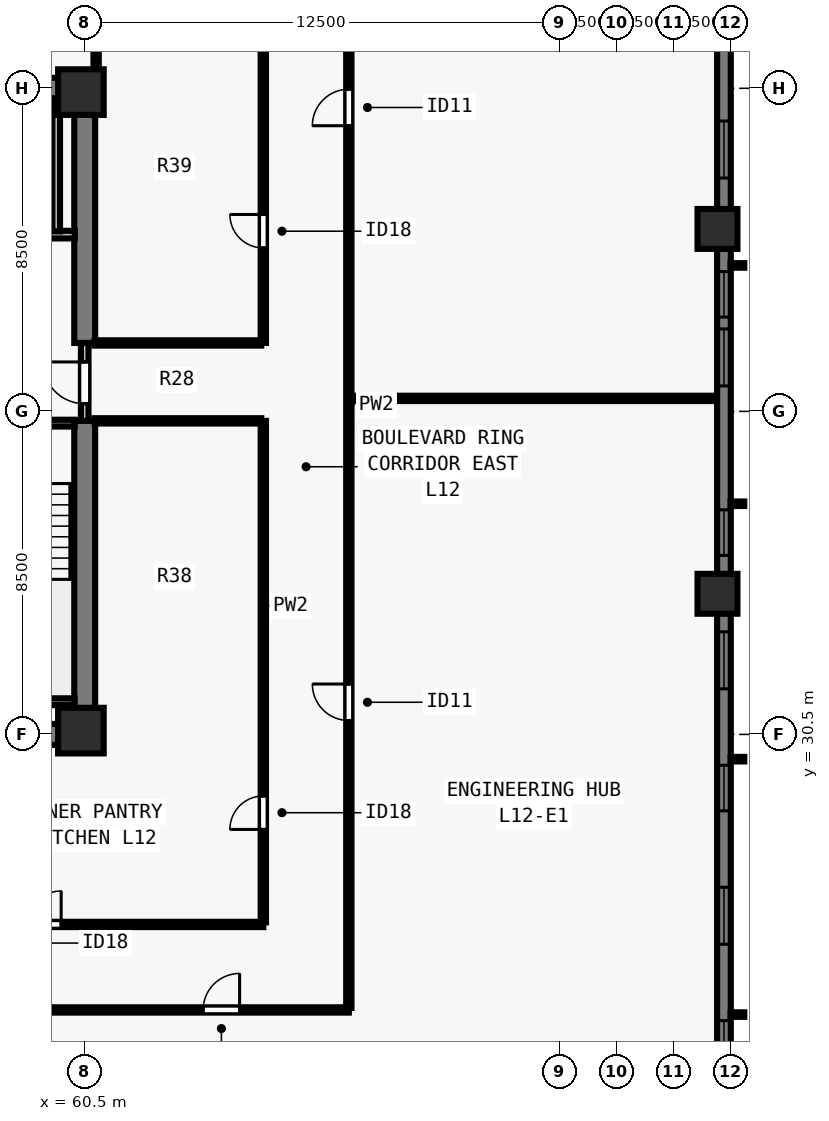
"""IFC4 building model, lengths in metres.
Left out: names, types, materials, properties, quantities, classifications, styles, units other than length and angle.
Written with IfcOpenShell. Run it as: python <this file> out.ifc"""

import sys

from ifc_helpers import new_model, si_unit, direction, frame, frame_2d, origin, origin_2d, place, context, subcontext, project, spatial, rectangle, extrude, element, fill, save


model = new_model("IFC4")
c1 = context("Model", 3, precision=1e-05, world=origin(), true_north=direction((0.0, 1.0)))
c2 = subcontext(c1, "Body", "Model", "MODEL_VIEW")
j1 = project(units=[si_unit("LENGTHUNIT", "METRE"), si_unit("PLANEANGLEUNIT", "RADIAN")], contexts=[c1])
p1 = place(None, origin())
s1 = spatial("IfcSite", under=j1, at=p1, CompositionType="ELEMENT")
p2 = place(p1, origin())
s2 = spatial("IfcBuilding", under=s1, at=p2, CompositionType="ELEMENT")
p3 = place(p2, frame((0.0, 0.0, 48.0)))
s3 = spatial("IfcBuildingStorey", under=s2, at=p3, CompositionType="ELEMENT", Elevation=48.0)
for number, where, z_axis, x_axis in (
    (1, (60.4, 30.6, 0.0), (0.0, 0.0, 1.0), (1.0, 0.0, 0.0)),
    (2, (60.4, 47.4, 0.0), (0.0, 0.0, 1.0), (1.0, 0.0, 0.0)),
):
    element("IfcColumn", number, at=place(p3, frame(where, z_axis=z_axis, x_axis=x_axis)), inside=s3, PredefinedType="COLUMN", context=c2, shape_type="SweptSolid", body=[
        extrude(rectangle(XDim=1.2, YDim=1.2, at=origin_2d()), origin(), (0.0, 0.0, 1.0), 3.5),
    ])
for number, where, z_axis, x_axis in (
    (3, (77.15, 34.2, 0.0), (0.0, 0.0, 1.0), (0.0, 1.0, 0.0)),
    (4, (77.15, 43.8, 0.0), (0.0, 0.0, 1.0), (0.0, 1.0, 0.0)),
):
    element("IfcColumn", number, at=place(p3, frame(where, z_axis=z_axis, x_axis=x_axis)), inside=s3, PredefinedType="COLUMN", context=c2, shape_type="SweptSolid", body=[
        extrude(rectangle(XDim=1.05, YDim=1.05, at=origin_2d()), origin(), (0.0, 0.0, 1.0), 3.5),
    ])
p4 = place(p3, frame((77.32, 61.5, 0.0), z_axis=(0.0, 0.0, 1.0), x_axis=(0.0, -1.0, 0.0)))
e5 = element("IfcWall", 5, at=p4, inside=s3, PredefinedType="SOLIDWALL", context=c2, shape_type="SweptSolid", body=[
    extrude(rectangle(XDim=44.662, YDim=0.36, at=frame_2d((22.331, 0.0))), origin(), (0.0, 0.0, 1.0), 3.28),
])
p5 = place(p4, frame((4.93, 0.0, 0.8)))
e6 = element("IfcOpeningElement", 6, at=p5, cuts=e5, PredefinedType="OPENING", context=c2, shape_type="SweptSolid", body=[
    extrude(rectangle(XDim=1.2, YDim=1.544, at=frame_2d((0.6, 0.772))), frame((0.0, 0.19, 0.0), z_axis=(0.0, -1.0, 0.0), x_axis=(1.0, 0.0, 0.0)), (0.0, 0.0, 1.0), 0.38),
])
p6 = place(p4, frame((8.14, 0.0, 0.8)))
e7 = element("IfcOpeningElement", 7, at=p6, cuts=e5, PredefinedType="OPENING", context=c2, shape_type="SweptSolid", body=[
    extrude(rectangle(XDim=1.5, YDim=1.544, at=frame_2d((0.75, 0.772))), frame((0.0, 0.19, 0.0), z_axis=(0.0, -1.0, 0.0), x_axis=(1.0, 0.0, 0.0)), (0.0, 0.0, 1.0), 0.38),
])
p7 = place(p4, frame((11.65, 0.0, 0.8)))
e8 = element("IfcOpeningElement", 8, at=p7, cuts=e5, PredefinedType="OPENING", context=c2, shape_type="SweptSolid", body=[
    extrude(rectangle(XDim=1.2, YDim=1.544, at=frame_2d((0.6, 0.772))), frame((0.0, 0.19, 0.0), z_axis=(0.0, -1.0, 0.0), x_axis=(1.0, 0.0, 0.0)), (0.0, 0.0, 1.0), 0.38),
])
p8 = place(p4, frame((14.861, 0.0, 0.8)))
e9 = element("IfcOpeningElement", 9, at=p8, cuts=e5, PredefinedType="OPENING", context=c2, shape_type="SweptSolid", body=[
    extrude(rectangle(XDim=1.5, YDim=1.544, at=frame_2d((0.75, 0.772))), frame((0.0, 0.19, 0.0), z_axis=(0.0, -1.0, 0.0), x_axis=(1.0, 0.0, 0.0)), (0.0, 0.0, 1.0), 0.38),
])
p9 = place(p4, frame((18.821, 0.0, 0.8)))
e10 = element("IfcOpeningElement", 10, at=p9, cuts=e5, PredefinedType="OPENING", context=c2, shape_type="SweptSolid", body=[
    extrude(rectangle(XDim=1.2, YDim=1.544, at=frame_2d((0.6, 0.772))), frame((0.0, 0.19, 0.0), z_axis=(0.0, -1.0, 0.0), x_axis=(1.0, 0.0, 0.0)), (0.0, 0.0, 1.0), 0.38),
])
p10 = place(p4, frame((20.331, 0.0, 0.8)))
e11 = element("IfcOpeningElement", 11, at=p10, cuts=e5, PredefinedType="OPENING", context=c2, shape_type="SweptSolid", body=[
    extrude(rectangle(XDim=1.5, YDim=1.544, at=frame_2d((0.75, 0.772))), frame((0.0, 0.19, 0.0), z_axis=(0.0, -1.0, 0.0), x_axis=(1.0, 0.0, 0.0)), (0.0, 0.0, 1.0), 0.38),
])
p11 = place(p4, frame((25.091, 0.0, 0.8)))
e12 = element("IfcOpeningElement", 12, at=p11, cuts=e5, PredefinedType="OPENING", context=c2, shape_type="SweptSolid", body=[
    extrude(rectangle(XDim=1.2, YDim=1.544, at=frame_2d((0.6, 0.772))), frame((0.0, 0.19, 0.0), z_axis=(0.0, -1.0, 0.0), x_axis=(1.0, 0.0, 0.0)), (0.0, 0.0, 1.0), 0.38),
])
p12 = place(p4, frame((28.302, 0.0, 0.8)))
e13 = element("IfcOpeningElement", 13, at=p12, cuts=e5, PredefinedType="OPENING", context=c2, shape_type="SweptSolid", body=[
    extrude(rectangle(XDim=1.5, YDim=1.544, at=frame_2d((0.75, 0.772))), frame((0.0, 0.19, 0.0), z_axis=(0.0, -1.0, 0.0), x_axis=(1.0, 0.0, 0.0)), (0.0, 0.0, 1.0), 0.38),
])
p13 = place(p4, frame((31.812, 0.0, 0.8)))
e14 = element("IfcOpeningElement", 14, at=p13, cuts=e5, PredefinedType="OPENING", context=c2, shape_type="SweptSolid", body=[
    extrude(rectangle(XDim=1.2, YDim=1.544, at=frame_2d((0.6, 0.772))), frame((0.0, 0.19, 0.0), z_axis=(0.0, -1.0, 0.0), x_axis=(1.0, 0.0, 0.0)), (0.0, 0.0, 1.0), 0.38),
])
p14 = place(p4, frame((35.022, 0.0, 0.8)))
e15 = element("IfcOpeningElement", 15, at=p14, cuts=e5, PredefinedType="OPENING", context=c2, shape_type="SweptSolid", body=[
    extrude(rectangle(XDim=1.5, YDim=1.544, at=frame_2d((0.75, 0.772))), frame((0.0, 0.19, 0.0), z_axis=(0.0, -1.0, 0.0), x_axis=(1.0, 0.0, 0.0)), (0.0, 0.0, 1.0), 0.38),
])
p15 = place(p4, frame((38.532, 0.0, 0.8)))
e16 = element("IfcOpeningElement", 16, at=p15, cuts=e5, PredefinedType="OPENING", context=c2, shape_type="SweptSolid", body=[
    extrude(rectangle(XDim=1.2, YDim=1.544, at=frame_2d((0.6, 0.772))), frame((0.0, 0.19, 0.0), z_axis=(0.0, -1.0, 0.0), x_axis=(1.0, 0.0, 0.0)), (0.0, 0.0, 1.0), 0.38),
])
for number, where, z_axis, x_axis in (
    (17, (43.225, 30.5, 0.0), (0.0, 0.0, 1.0), (1.0, 0.0, 0.0)),
    (18, (43.225, 47.5, 0.0), (0.0, 0.0, 1.0), (1.0, 0.0, 0.0)),
):
    element("IfcWall", number, at=place(p3, frame(where, z_axis=z_axis, x_axis=x_axis)), inside=s3, PredefinedType="SHEAR", context=c2, shape_type="SweptSolid", body=[
        extrude(rectangle(XDim=17.55, YDim=0.55, at=frame_2d((8.775, 0.0))), origin(), (0.0, 0.0, 1.0), 3.28),
    ])
p16 = place(p3, frame((60.5, 30.765, 0.0), z_axis=(0.0, 0.0, 1.0), x_axis=(0.0, 1.0, 0.0)))
e19 = element("IfcWall", 19, at=p16, inside=s3, PredefinedType="SHEAR", context=c2, shape_type="SweptSolid", body=[
    extrude(rectangle(XDim=7.985, YDim=0.55, at=frame_2d((3.993, 0.0))), origin(), (0.0, 0.0, 1.0), 3.28),
])
p17 = place(p3, frame((60.5, 40.8, 0.0), z_axis=(0.0, 0.0, 1.0), x_axis=(0.0, 1.0, 0.0)))
e20 = element("IfcWall", 20, at=p17, inside=s3, PredefinedType="SHEAR", context=c2, shape_type="SweptSolid", body=[
    extrude(rectangle(XDim=6.435, YDim=0.55, at=frame_2d((3.218, 0.0))), origin(), (0.0, 0.0, 1.0), 3.28),
])
p18 = place(p3, frame((60.5, 38.75, 0.0), z_axis=(0.0, 0.0, 1.0), x_axis=(0.0, 1.0, 0.0)))
e21 = element("IfcWall", 21, at=p18, inside=s3, PredefinedType="SOLIDWALL", context=c2, shape_type="SweptSolid", body=[
    extrude(rectangle(XDim=2.05, YDim=0.2, at=frame_2d((1.025, 0.0))), origin(), (0.0, 0.0, 1.0), 3.28),
])
p19 = place(p18, frame((0.45, 0.0, 0.0)))
e22 = element("IfcOpeningElement", 22, at=p19, cuts=e21, PredefinedType="OPENING", context=c2, shape_type="SweptSolid", body=[
    extrude(rectangle(XDim=1.1, YDim=2.15, at=frame_2d((0.55, 1.075))), frame((0.0, 0.11, 0.0), z_axis=(0.0, -1.0, 0.0), x_axis=(1.0, 0.0, 0.0)), (0.0, 0.0, 1.0), 0.22),
])
p20 = place(p3, frame((56.735, 43.65, 0.0), z_axis=(0.0, 0.0, 1.0), x_axis=(1.0, 0.0, 0.0)))
e23 = element("IfcWall", 23, at=p20, inside=s3, PredefinedType="SOLIDWALL", context=c2, shape_type="SweptSolid", body=[
    extrude(rectangle(XDim=3.505, YDim=0.2, at=frame_2d((1.752, 0.0))), origin(), (0.0, 0.0, 1.0), 3.28),
])
p21 = place(p20, frame((1.295, 0.0, 0.0)))
e24 = element("IfcOpeningElement", 24, at=p21, cuts=e23, PredefinedType="OPENING", context=c2, shape_type="SweptSolid", body=[
    extrude(rectangle(XDim=1.1, YDim=2.2, at=frame_2d((0.55, 1.1))), frame((0.0, 0.11, 0.0), z_axis=(0.0, -1.0, 0.0), x_axis=(1.0, 0.0, 0.0)), (0.0, 0.0, 1.0), 0.22),
])
p22 = place(p3, frame((59.75, 43.735, 0.0), z_axis=(0.0, 0.0, 1.0), x_axis=(0.0, 1.0, 0.0)))
e25 = element("IfcWall", 25, at=p22, inside=s3, PredefinedType="SOLIDWALL", context=c2, shape_type="SweptSolid", body=[
    extrude(rectangle(XDim=3.505, YDim=0.2, at=frame_2d((1.752, 0.0))), origin(), (0.0, 0.0, 1.0), 3.28),
])
p23 = place(p3, frame((36.55, 23.25, 0.0), z_axis=(0.0, 0.0, 1.0), x_axis=(1.0, 0.0, 0.0)))
e26 = element("IfcWall", 26, at=p23, inside=s3, PredefinedType="PARTITIONING", context=c2, shape_type="SweptSolid", body=[
    extrude(rectangle(XDim=30.9, YDim=0.14, at=frame_2d((15.45, 0.0))), origin(), (0.0, 0.0, 1.0), 3.28),
])
p24 = place(p23, frame((2.386, 0.0, 0.0)))
e27 = element("IfcOpeningElement", 27, at=p24, cuts=e26, PredefinedType="OPENING", context=c2, shape_type="SweptSolid", body=[
    extrude(rectangle(XDim=0.96, YDim=2.12, at=frame_2d((0.48, 1.06))), frame((0.0, 0.08, 0.0), z_axis=(0.0, -1.0, 0.0), x_axis=(1.0, 0.0, 0.0)), (0.0, 0.0, 1.0), 0.16),
])
p25 = place(p23, frame((27.066, 0.0, 0.0)))
e28 = element("IfcOpeningElement", 28, at=p25, cuts=e26, PredefinedType="OPENING", context=c2, shape_type="SweptSolid", body=[
    extrude(rectangle(XDim=0.96, YDim=2.12, at=frame_2d((0.48, 1.06))), frame((0.0, 0.08, 0.0), z_axis=(0.0, -1.0, 0.0), x_axis=(1.0, 0.0, 0.0)), (0.0, 0.0, 1.0), 0.16),
])
p26 = place(p3, frame((67.45, 23.305, 0.0), z_axis=(0.0, 0.0, 1.0), x_axis=(0.0, 1.0, 0.0)))
e29 = element("IfcWall", 29, at=p26, inside=s3, PredefinedType="PARTITIONING", context=c2, shape_type="SweptSolid", body=[
    extrude(rectangle(XDim=31.39, YDim=0.14, at=frame_2d((15.695, 0.0))), origin(), (0.0, 0.0, 1.0), 3.28),
])
p27 = place(p26, frame((7.561, 0.0, 0.0)))
e30 = element("IfcOpeningElement", 30, at=p27, cuts=e29, PredefinedType="OPENING", context=c2, shape_type="SweptSolid", body=[
    extrude(rectangle(XDim=0.96, YDim=2.12, at=frame_2d((0.48, 1.06))), frame((0.0, 0.08, 0.0), z_axis=(0.0, -1.0, 0.0), x_axis=(1.0, 0.0, 0.0)), (0.0, 0.0, 1.0), 0.16),
])
p28 = place(p26, frame((23.211, 0.0, 0.0)))
e31 = element("IfcOpeningElement", 31, at=p28, cuts=e29, PredefinedType="OPENING", context=c2, shape_type="SweptSolid", body=[
    extrude(rectangle(XDim=0.96, YDim=2.12, at=frame_2d((0.48, 1.06))), frame((0.0, 0.08, 0.0), z_axis=(0.0, -1.0, 0.0), x_axis=(1.0, 0.0, 0.0)), (0.0, 0.0, 1.0), 0.16),
])
p29 = place(p3, frame((38.8, 25.5, 0.0), z_axis=(0.0, 0.0, 1.0), x_axis=(1.0, 0.0, 0.0)))
e32 = element("IfcWall", 32, at=p29, inside=s3, PredefinedType="PARTITIONING", context=c2, shape_type="SweptSolid", body=[
    extrude(rectangle(XDim=26.4, YDim=0.14, at=frame_2d((13.2, 0.0))), origin(), (0.0, 0.0, 1.0), 3.28),
])
p30 = place(p29, frame((1.2, 0.0, 0.0)))
e33 = element("IfcOpeningElement", 33, at=p30, cuts=e32, PredefinedType="OPENING", context=c2, shape_type="SweptSolid", body=[
    extrude(rectangle(XDim=0.88, YDim=2.1, at=frame_2d((0.44, 1.05))), frame((0.0, 0.08, 0.0), z_axis=(0.0, -1.0, 0.0), x_axis=(1.0, 0.0, 0.0)), (0.0, 0.0, 1.0), 0.16),
])
p31 = place(p29, frame((9.7, 0.0, 0.0)))
e34 = element("IfcOpeningElement", 34, at=p31, cuts=e32, PredefinedType="OPENING", context=c2, shape_type="SweptSolid", body=[
    extrude(rectangle(XDim=0.88, YDim=2.1, at=frame_2d((0.44, 1.05))), frame((0.0, 0.08, 0.0), z_axis=(0.0, -1.0, 0.0), x_axis=(1.0, 0.0, 0.0)), (0.0, 0.0, 1.0), 0.16),
])
p32 = place(p29, frame((20.2, 0.0, 0.0)))
e35 = element("IfcOpeningElement", 35, at=p32, cuts=e32, PredefinedType="OPENING", context=c2, shape_type="SweptSolid", body=[
    extrude(rectangle(XDim=0.88, YDim=2.1, at=frame_2d((0.44, 1.05))), frame((0.0, 0.08, 0.0), z_axis=(0.0, -1.0, 0.0), x_axis=(1.0, 0.0, 0.0)), (0.0, 0.0, 1.0), 0.16),
])
p33 = place(p3, frame((65.2, 25.555, 0.0), z_axis=(0.0, 0.0, 1.0), x_axis=(0.0, 1.0, 0.0)))
e36 = element("IfcWall", 36, at=p33, inside=s3, PredefinedType="PARTITIONING", context=c2, shape_type="SweptSolid", body=[
    extrude(rectangle(XDim=13.195, YDim=0.14, at=frame_2d((6.598, 0.0))), origin(), (0.0, 0.0, 1.0), 3.28),
])
p34 = place(p33, frame((2.445, 0.0, 0.0)))
e37 = element("IfcOpeningElement", 37, at=p34, cuts=e36, PredefinedType="OPENING", context=c2, shape_type="SweptSolid", body=[
    extrude(rectangle(XDim=0.88, YDim=2.1, at=frame_2d((0.44, 1.05))), frame((0.0, 0.08, 0.0), z_axis=(0.0, -1.0, 0.0), x_axis=(1.0, 0.0, 0.0)), (0.0, 0.0, 1.0), 0.16),
])
p35 = place(p3, frame((65.2, 40.8, 0.0), z_axis=(0.0, 0.0, 1.0), x_axis=(0.0, 1.0, 0.0)))
e38 = element("IfcWall", 38, at=p35, inside=s3, PredefinedType="PARTITIONING", context=c2, shape_type="SweptSolid", body=[
    extrude(rectangle(XDim=11.645, YDim=0.14, at=frame_2d((5.823, 0.0))), origin(), (0.0, 0.0, 1.0), 3.28),
])
p36 = place(p35, frame((2.5, 0.0, 0.0)))
e39 = element("IfcOpeningElement", 39, at=p36, cuts=e38, PredefinedType="OPENING", context=c2, shape_type="SweptSolid", body=[
    extrude(rectangle(XDim=0.88, YDim=2.1, at=frame_2d((0.44, 1.05))), frame((0.0, 0.08, 0.0), z_axis=(0.0, -1.0, 0.0), x_axis=(1.0, 0.0, 0.0)), (0.0, 0.0, 1.0), 0.16),
])
for number, where, z_axis, x_axis in (
    (40, (60.76, 38.75, 0.0), (0.0, 0.0, 1.0), (1.0, 0.0, 0.0)),
    (41, (60.76, 40.8, 0.0), (0.0, 0.0, 1.0), (1.0, 0.0, 0.0)),
):
    element("IfcWall", number, at=place(p3, frame(where, z_axis=z_axis, x_axis=x_axis)), inside=s3, PredefinedType="PARTITIONING", context=c2, shape_type="SweptSolid", body=[
        extrude(rectangle(XDim=4.385, YDim=0.14, at=frame_2d((2.192, 0.0))), origin(), (0.0, 0.0, 1.0), 3.28),
    ])
p37 = place(p3, frame((60.8, 47.76, 0.0), z_axis=(0.0, 0.0, 1.0), x_axis=(0.0, 1.0, 0.0)))
e42 = element("IfcWall", 42, at=p37, inside=s3, PredefinedType="PARTITIONING", context=c2, shape_type="SweptSolid", body=[
    extrude(rectangle(XDim=4.685, YDim=0.14, at=frame_2d((2.343, 0.0))), origin(), (0.0, 0.0, 1.0), 2.439),
])
p38 = place(p3, frame((67.55, 39.341, 0.0), z_axis=(0.0, 0.0, 1.0), x_axis=(1.0, 0.0, 0.0)))
e43 = element("IfcWall", 43, at=p38, inside=s3, PredefinedType="PARTITIONING", context=c2, shape_type="SweptSolid", body=[
    extrude(rectangle(XDim=9.53, YDim=0.14, at=frame_2d((4.765, 0.0))), origin(), (0.0, 0.0, 1.0), 3.28),
])
p39 = place(p3, frame((57.005, 38.69, 0.0), z_axis=(0.0, 0.0, 1.0), x_axis=(1.0, 0.0, 0.0)))
e44 = element("IfcWall", 44, at=p39, inside=s3, PredefinedType="SOLIDWALL", context=c2, shape_type="SweptSolid", body=[
    extrude(rectangle(XDim=3.23, YDim=0.18, at=frame_2d((1.615, 0.0))), origin(), (0.0, 0.0, 1.0), 3.28),
])
p40 = place(p39, frame((1.14, 0.0, 0.0)))
e45 = element("IfcOpeningElement", 45, at=p40, cuts=e44, PredefinedType="OPENING", context=c2, shape_type="SweptSolid", body=[
    extrude(rectangle(XDim=0.95, YDim=2.15, at=frame_2d((0.475, 1.075))), frame((0.0, 0.1, 0.0), z_axis=(0.0, -1.0, 0.0), x_axis=(1.0, 0.0, 0.0)), (0.0, 0.0, 1.0), 0.2),
])
p41 = place(p3, frame((57.005, 31.36, 0.0), z_axis=(0.0, 0.0, 1.0), x_axis=(1.0, 0.0, 0.0)))
e46 = element("IfcWall", 46, at=p41, inside=s3, PredefinedType="SOLIDWALL", context=c2, shape_type="SweptSolid", body=[
    extrude(rectangle(XDim=3.23, YDim=0.18, at=frame_2d((1.615, 0.0))), origin(), (0.0, 0.0, 1.0), 3.28),
])
p42 = place(p8, origin())
e47 = element("IfcWindow", 47, at=p42, inside=s3, PartitioningType="SINGLE_PANEL", PredefinedType="WINDOW", context=c2, shape_type="SweptSolid", body=[
    extrude(rectangle(XDim=1.5, YDim=1.544, at=frame_2d((0.75, 0.772))), frame((0.0, -0.05, 0.0), z_axis=(0.0, -1.0, 0.0), x_axis=(1.0, 0.0, 0.0)), (0.0, 0.0, 1.0), 0.06),
])
fill(e9, e47)
p43 = place(p9, origin())
e48 = element("IfcWindow", 48, at=p43, inside=s3, PartitioningType="SINGLE_PANEL", PredefinedType="WINDOW", context=c2, shape_type="SweptSolid", body=[
    extrude(rectangle(XDim=1.2, YDim=1.544, at=frame_2d((0.6, 0.772))), frame((0.0, -0.05, 0.0), z_axis=(0.0, -1.0, 0.0), x_axis=(1.0, 0.0, 0.0)), (0.0, 0.0, 1.0), 0.06),
])
fill(e10, e48)
p44 = place(p10, origin())
e49 = element("IfcWindow", 49, at=p44, inside=s3, PartitioningType="SINGLE_PANEL", PredefinedType="WINDOW", context=c2, shape_type="SweptSolid", body=[
    extrude(rectangle(XDim=1.5, YDim=1.544, at=frame_2d((0.75, 0.772))), frame((0.0, -0.05, 0.0), z_axis=(0.0, -1.0, 0.0), x_axis=(1.0, 0.0, 0.0)), (0.0, 0.0, 1.0), 0.06),
])
fill(e11, e49)
p45 = place(p11, origin())
e50 = element("IfcWindow", 50, at=p45, inside=s3, PartitioningType="SINGLE_PANEL", PredefinedType="WINDOW", context=c2, shape_type="SweptSolid", body=[
    extrude(rectangle(XDim=1.2, YDim=1.544, at=frame_2d((0.6, 0.772))), frame((0.0, -0.05, 0.0), z_axis=(0.0, -1.0, 0.0), x_axis=(1.0, 0.0, 0.0)), (0.0, 0.0, 1.0), 0.06),
])
fill(e12, e50)
p46 = place(p12, origin())
e51 = element("IfcWindow", 51, at=p46, inside=s3, PartitioningType="SINGLE_PANEL", PredefinedType="WINDOW", context=c2, shape_type="SweptSolid", body=[
    extrude(rectangle(XDim=1.5, YDim=1.544, at=frame_2d((0.75, 0.772))), frame((0.0, -0.05, 0.0), z_axis=(0.0, -1.0, 0.0), x_axis=(1.0, 0.0, 0.0)), (0.0, 0.0, 1.0), 0.06),
])
fill(e13, e51)
p47 = place(p13, origin())
e52 = element("IfcWindow", 52, at=p47, inside=s3, PartitioningType="SINGLE_PANEL", PredefinedType="WINDOW", context=c2, shape_type="SweptSolid", body=[
    extrude(rectangle(XDim=1.2, YDim=1.544, at=frame_2d((0.6, 0.772))), frame((0.0, -0.05, 0.0), z_axis=(0.0, -1.0, 0.0), x_axis=(1.0, 0.0, 0.0)), (0.0, 0.0, 1.0), 0.06),
])
fill(e14, e52)
p48 = place(p14, origin())
e53 = element("IfcWindow", 53, at=p48, inside=s3, PartitioningType="SINGLE_PANEL", PredefinedType="WINDOW", context=c2, shape_type="SweptSolid", body=[
    extrude(rectangle(XDim=1.5, YDim=1.544, at=frame_2d((0.75, 0.772))), frame((0.0, -0.05, 0.0), z_axis=(0.0, -1.0, 0.0), x_axis=(1.0, 0.0, 0.0)), (0.0, 0.0, 1.0), 0.06),
])
fill(e15, e53)
p49 = place(p15, origin())
e54 = element("IfcWindow", 54, at=p49, inside=s3, PartitioningType="SINGLE_PANEL", PredefinedType="WINDOW", context=c2, shape_type="SweptSolid", body=[
    extrude(rectangle(XDim=1.2, YDim=1.544, at=frame_2d((0.6, 0.772))), frame((0.0, -0.05, 0.0), z_axis=(0.0, -1.0, 0.0), x_axis=(1.0, 0.0, 0.0)), (0.0, 0.0, 1.0), 0.06),
])
fill(e16, e54)
p50 = place(p19, origin())
e55 = element("IfcDoor", 55, at=p50, inside=s3, OperationType="SINGLE_SWING_RIGHT", PredefinedType="DOOR", context=c2, shape_type="SweptSolid", body=[
    extrude(rectangle(XDim=1.1, YDim=2.15, at=frame_2d((0.55, 1.075))), frame((0.0, 0.025, 0.0), z_axis=(0.0, -1.0, 0.0), x_axis=(1.0, 0.0, 0.0)), (0.0, 0.0, 1.0), 0.05),
])
fill(e22, e55)
p51 = place(p32, origin())
e56 = element("IfcDoor", 56, at=p51, inside=s3, OperationType="SINGLE_SWING_RIGHT", PredefinedType="DOOR", context=c2, shape_type="SweptSolid", body=[
    extrude(rectangle(XDim=0.88, YDim=2.1, at=frame_2d((0.44, 1.05))), frame((0.0, 0.025, 0.0), z_axis=(0.0, -1.0, 0.0), x_axis=(1.0, 0.0, 0.0)), (0.0, 0.0, 1.0), 0.05),
])
fill(e35, e56)
p52 = place(p34, origin())
e57 = element("IfcDoor", 57, at=p52, inside=s3, OperationType="SINGLE_SWING_LEFT", PredefinedType="DOOR", context=c2, shape_type="SweptSolid", body=[
    extrude(rectangle(XDim=0.88, YDim=2.1, at=frame_2d((0.44, 1.05))), frame((0.0, 0.025, 0.0), z_axis=(0.0, -1.0, 0.0), x_axis=(1.0, 0.0, 0.0)), (0.0, 0.0, 1.0), 0.05),
])
fill(e37, e57)
p53 = place(p36, origin())
e58 = element("IfcDoor", 58, at=p53, inside=s3, OperationType="SINGLE_SWING_RIGHT", PredefinedType="DOOR", context=c2, shape_type="SweptSolid", body=[
    extrude(rectangle(XDim=0.88, YDim=2.1, at=frame_2d((0.44, 1.05))), frame((0.0, 0.025, 0.0), z_axis=(0.0, -1.0, 0.0), x_axis=(1.0, 0.0, 0.0)), (0.0, 0.0, 1.0), 0.05),
])
fill(e39, e58)
p54 = place(p25, origin())
e59 = element("IfcDoor", 59, at=p54, inside=s3, OperationType="SINGLE_SWING_RIGHT", PredefinedType="DOOR", context=c2, shape_type="SweptSolid", body=[
    extrude(rectangle(XDim=0.96, YDim=2.12, at=frame_2d((0.48, 1.06))), frame((0.0, 0.025, 0.0), z_axis=(0.0, -1.0, 0.0), x_axis=(1.0, 0.0, 0.0)), (0.0, 0.0, 1.0), 0.05),
])
fill(e28, e59)
p55 = place(p27, origin())
e60 = element("IfcDoor", 60, at=p55, inside=s3, OperationType="SINGLE_SWING_RIGHT", PredefinedType="DOOR", context=c2, shape_type="SweptSolid", body=[
    extrude(rectangle(XDim=0.96, YDim=2.12, at=frame_2d((0.48, 1.06))), frame((0.0, 0.025, 0.0), z_axis=(0.0, -1.0, 0.0), x_axis=(1.0, 0.0, 0.0)), (0.0, 0.0, 1.0), 0.05),
])
fill(e30, e60)
p56 = place(p28, origin())
e61 = element("IfcDoor", 61, at=p56, inside=s3, OperationType="SINGLE_SWING_LEFT", PredefinedType="DOOR", context=c2, shape_type="SweptSolid", body=[
    extrude(rectangle(XDim=0.96, YDim=2.12, at=frame_2d((0.48, 1.06))), frame((0.0, 0.025, 0.0), z_axis=(0.0, -1.0, 0.0), x_axis=(1.0, 0.0, 0.0)), (0.0, 0.0, 1.0), 0.05),
])
fill(e31, e61)
save(model, sys.argv[1])
